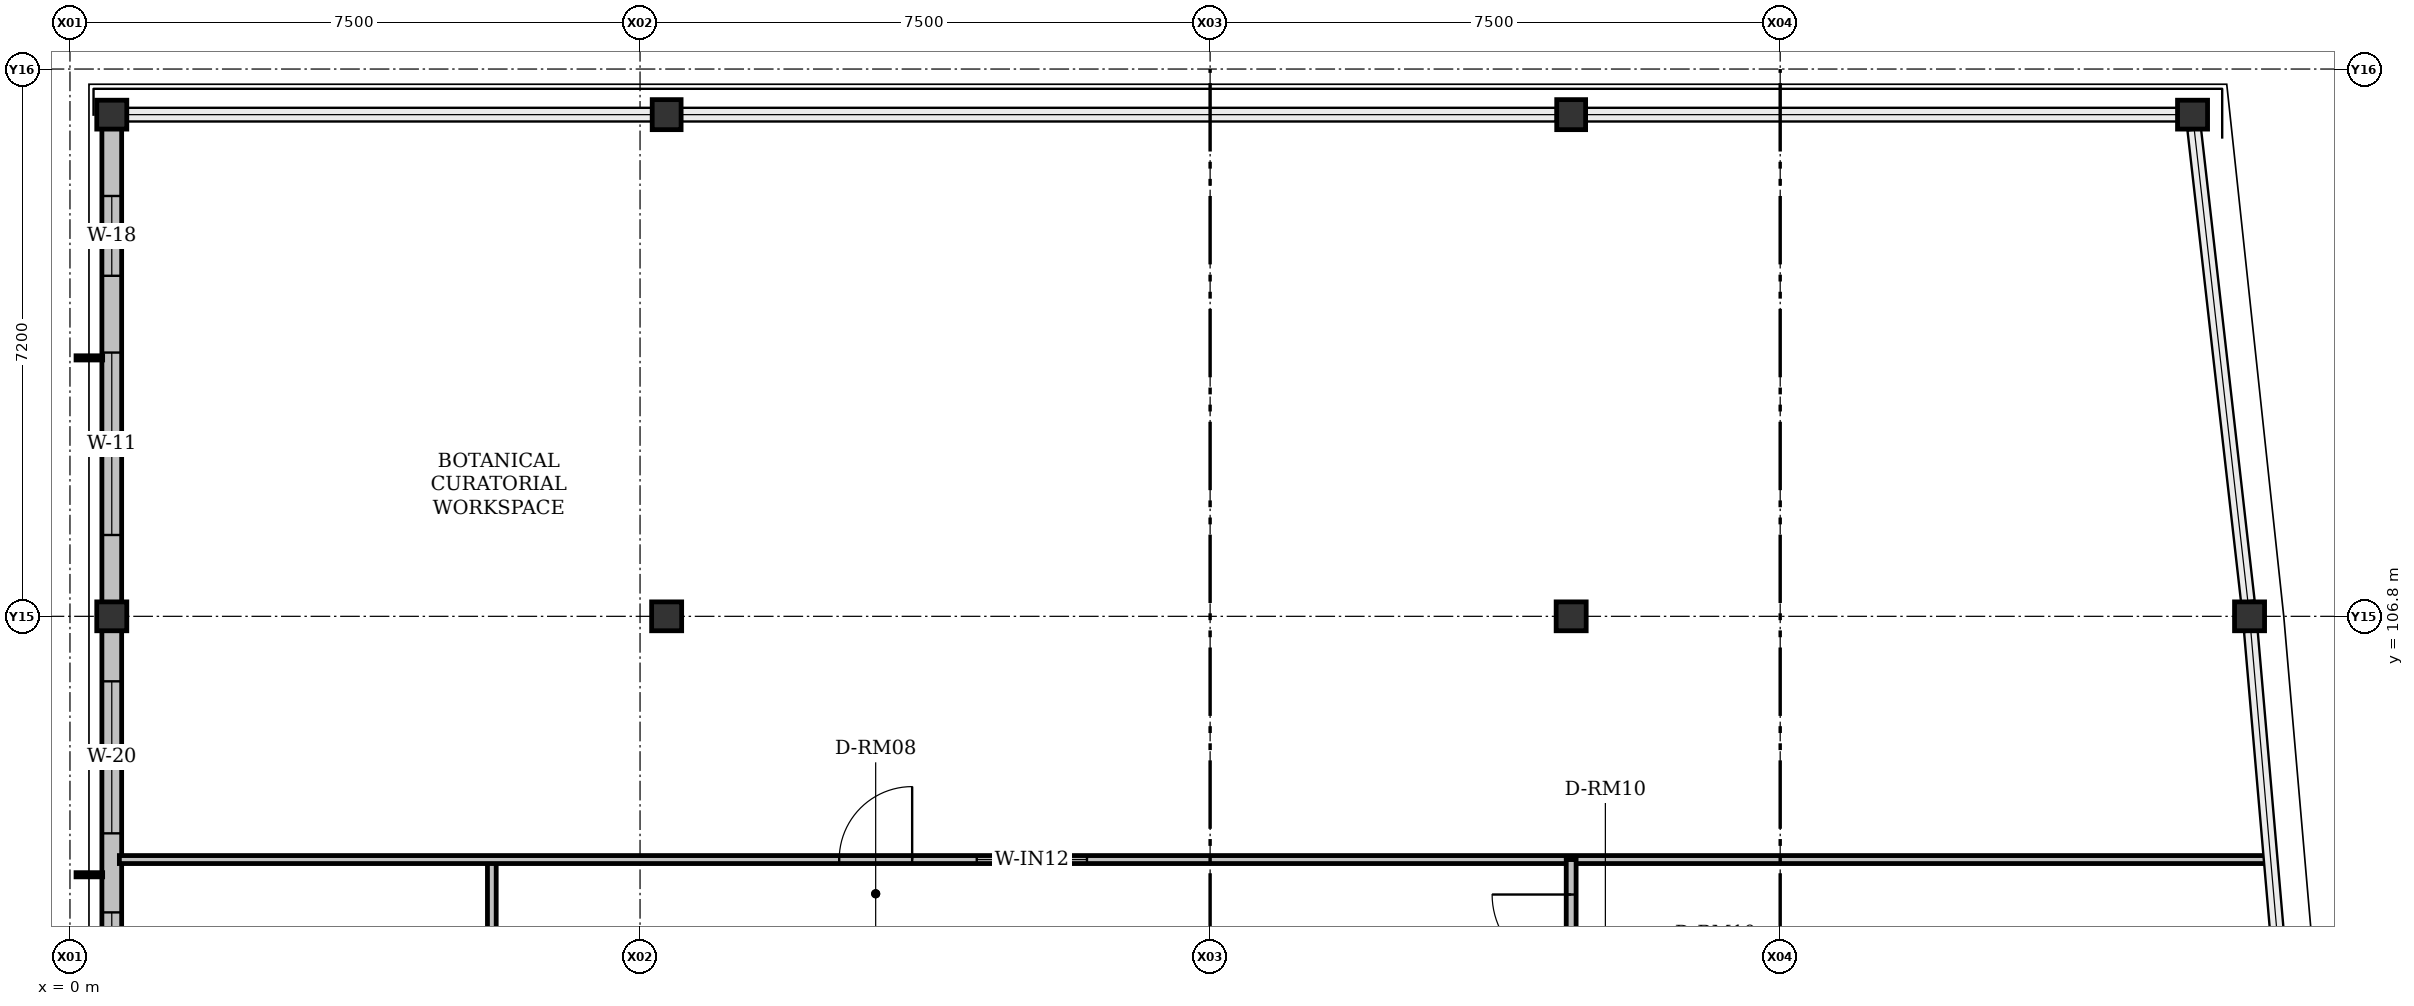
"""IFC4 building model, lengths in metres.
Left out: names, types, materials, properties, quantities, classifications, styles, units other than length and angle.
Written with IfcOpenShell. Run it as: python <this file> out.ifc"""

import sys

from ifc_helpers import new_model, si_unit, direction, frame, frame_2d, origin, origin_2d, place, context, subcontext, project, spatial, rectangle, i_section, extrude, element, fill, save


model = new_model("IFC4")
c1 = context("Model", 3, precision=1e-05, world=origin(), true_north=direction((0.0, 1.0)))
c2 = subcontext(c1, "Body", "Model", "MODEL_VIEW")
j1 = project(units=[si_unit("LENGTHUNIT", "METRE"), si_unit("PLANEANGLEUNIT", "RADIAN")], contexts=[c1])
p1 = place(None, origin())
s1 = spatial("IfcSite", under=j1, at=p1, CompositionType="ELEMENT")
p2 = place(p1, origin())
s2 = spatial("IfcBuilding", under=s1, at=p2, CompositionType="ELEMENT")
p3 = place(p2, frame((0.0, 0.0, 18.3)))
s3 = spatial("IfcBuildingStorey", under=s2, at=p3, CompositionType="ELEMENT", Elevation=18.3)
for number, where, z_axis, x_axis in (
    (1, (0.55, 106.8, 0.0), (0.0, 0.0, 1.0), (1.0, 0.0, 0.0)),
    (2, (7.85, 106.8, 0.0), (0.0, 0.0, 1.0), (1.0, 0.0, 0.0)),
    (3, (19.75, 106.8, 0.0), (0.0, 0.0, 1.0), (1.0, 0.0, 0.0)),
    (4, (28.675, 106.8, 0.0), (0.0, 0.0, 1.0), (1.0, 0.0, 0.0)),
    (5, (0.55, 113.4, 0.0), (0.0, 0.0, 1.0), (1.0, 0.0, 0.0)),
    (6, (7.85, 113.4, 0.0), (0.0, 0.0, 1.0), (0.0, 1.0, 0.0)),
    (7, (19.75, 113.4, 0.0), (0.0, 0.0, 1.0), (0.0, 1.0, 0.0)),
    (8, (27.925, 113.4, 0.0), (0.0, 0.0, 1.0), (1.0, 0.0, 0.0)),
):
    element("IfcColumn", number, at=place(p3, frame(where, z_axis=z_axis, x_axis=x_axis)), inside=s3, PredefinedType="COLUMN", context=c2, shape_type="SweptSolid", body=[
        extrude(i_section(OverallWidth=0.395, OverallDepth=0.38, WebThickness=0.019, FlangeThickness=0.03, FilletRadius=0.015, at=origin_2d()), origin(), (0.0, 0.0, 1.0), 4.2),
    ])
p4 = place(p3, frame((0.55, 99.6, 0.0), z_axis=(0.0, 0.0, 1.0), x_axis=(0.0, 1.0, 0.0)))
e9 = element("IfcWall", 9, at=p4, inside=s3, PredefinedType="SOLIDWALL", context=c2, shape_type="SweptSolid", body=[
    extrude(rectangle(XDim=7.2, YDim=0.26, at=frame_2d((3.6, 0.0))), origin(), (0.0, 0.0, 1.0), 3.577),
])
p5 = place(p4, frame((1.205, 0.0, 0.92)))
e10 = element("IfcOpeningElement", 10, at=p5, cuts=e9, PredefinedType="OPENING", context=c2, shape_type="SweptSolid", body=[
    extrude(rectangle(XDim=2.1, YDim=1.55, at=frame_2d((1.05, 0.775))), frame((0.0, 0.13, 0.0), z_axis=(0.0, -1.0, 0.0), x_axis=(1.0, 0.0, 0.0)), (0.0, 0.0, 1.0), 0.26),
])
p6 = place(p4, frame((4.345, 0.0, 0.92)))
e11 = element("IfcOpeningElement", 11, at=p6, cuts=e9, PredefinedType="OPENING", context=c2, shape_type="SweptSolid", body=[
    extrude(rectangle(XDim=2.0, YDim=1.35, at=frame_2d((1.0, 0.675))), frame((0.0, 0.13, 0.0), z_axis=(0.0, -1.0, 0.0), x_axis=(1.0, 0.0, 0.0)), (0.0, 0.0, 1.0), 0.26),
])
p7 = place(p3, frame((0.55, 106.8, 0.0), z_axis=(0.0, 0.0, 1.0), x_axis=(0.0, 1.0, 0.0)))
e12 = element("IfcWall", 12, at=p7, inside=s3, PredefinedType="SOLIDWALL", context=c2, shape_type="SweptSolid", body=[
    extrude(rectangle(XDim=6.6, YDim=0.26, at=frame_2d((3.3, 0.0))), origin(), (0.0, 0.0, 1.0), 3.577),
])
p8 = place(p7, frame((1.07, 0.0, 0.92)))
e13 = element("IfcOpeningElement", 13, at=p8, cuts=e12, PredefinedType="OPENING", context=c2, shape_type="SweptSolid", body=[
    extrude(rectangle(XDim=2.4, YDim=1.55, at=frame_2d((1.2, 0.775))), frame((0.0, 0.13, 0.0), z_axis=(0.0, -1.0, 0.0), x_axis=(1.0, 0.0, 0.0)), (0.0, 0.0, 1.0), 0.26),
])
p9 = place(p7, frame((4.48, 0.0, 0.92)))
e14 = element("IfcOpeningElement", 14, at=p9, cuts=e12, PredefinedType="OPENING", context=c2, shape_type="SweptSolid", body=[
    extrude(rectangle(XDim=1.05, YDim=1.3, at=frame_2d((0.525, 0.65))), frame((0.0, 0.13, 0.0), z_axis=(0.0, -1.0, 0.0), x_axis=(1.0, 0.0, 0.0)), (0.0, 0.0, 1.0), 0.26),
])
p10 = place(p3, frame((5.55, 92.4, 0.0), z_axis=(0.0, 0.0, 1.0), x_axis=(0.0, 1.0, 0.0)))
e15 = element("IfcWall", 15, at=p10, inside=s3, PredefinedType="PARTITIONING", context=c2, shape_type="SweptSolid", body=[
    extrude(rectangle(XDim=11.2, YDim=0.115, at=frame_2d((5.6, 0.0))), origin(), (0.0, 0.0, 1.0), 3.451),
])
p11 = place(p10, frame((5.14, 0.0, 0.0)))
e16 = element("IfcOpeningElement", 16, at=p11, cuts=e15, PredefinedType="OPENING", context=c2, shape_type="SweptSolid", body=[
    extrude(rectangle(XDim=0.92, YDim=2.15, at=frame_2d((0.46, 1.075))), frame((0.0, 0.058, 0.0), z_axis=(0.0, -1.0, 0.0), x_axis=(1.0, 0.0, 0.0)), (0.0, 0.0, 1.0), 0.115),
])
p12 = place(p10, frame((6.91, 0.0, 0.92)))
e17 = element("IfcOpeningElement", 17, at=p12, cuts=e15, PredefinedType="OPENING", context=c2, shape_type="SweptSolid", body=[
    extrude(rectangle(XDim=1.3, YDim=1.3, at=frame_2d((0.65, 0.65))), frame((0.0, 0.058, 0.0), z_axis=(0.0, -1.0, 0.0), x_axis=(1.0, 0.0, 0.0)), (0.0, 0.0, 1.0), 0.115),
])
p13 = place(p3, frame((0.65, 103.6, 0.0), z_axis=(0.0, 0.0, 1.0), x_axis=(1.0, 0.0, 0.0)))
e18 = element("IfcWall", 18, at=p13, inside=s3, PredefinedType="PARTITIONING", context=c2, shape_type="SweptSolid", body=[
    extrude(rectangle(XDim=28.265, YDim=0.105, at=frame_2d((14.133, 0.0))), origin(), (0.0, 0.0, 1.0), 3.527),
])
p14 = place(p13, frame((9.47, 0.0, 0.0)))
e19 = element("IfcOpeningElement", 19, at=p14, cuts=e18, PredefinedType="OPENING", context=c2, shape_type="SweptSolid", body=[
    extrude(rectangle(XDim=0.96, YDim=2.15, at=frame_2d((0.48, 1.075))), frame((0.0, 0.052, 0.0), z_axis=(0.0, -1.0, 0.0), x_axis=(1.0, 0.0, 0.0)), (0.0, 0.0, 1.0), 0.105),
])
p15 = place(p13, frame((11.28, 0.0, 0.92)))
e20 = element("IfcOpeningElement", 20, at=p15, cuts=e18, PredefinedType="OPENING", context=c2, shape_type="SweptSolid", body=[
    extrude(rectangle(XDim=1.45, YDim=1.3, at=frame_2d((0.725, 0.65))), frame((0.0, 0.052, 0.0), z_axis=(0.0, -1.0, 0.0), x_axis=(1.0, 0.0, 0.0)), (0.0, 0.0, 1.0), 0.105),
])
p16 = place(p3, frame((19.75, 99.792, 0.0), z_axis=(0.0, 0.0, 1.0), x_axis=(0.0, 1.0, 0.0)))
e21 = element("IfcWall", 21, at=p16, inside=s3, PredefinedType="PARTITIONING", context=c2, shape_type="SweptSolid", body=[
    extrude(rectangle(XDim=3.808, YDim=0.13, at=frame_2d((1.904, 0.0))), origin(), (0.0, 0.0, 1.0), 3.527),
])
p17 = place(p16, frame((2.308, 0.0, 0.0)))
e22 = element("IfcOpeningElement", 22, at=p17, cuts=e21, PredefinedType="OPENING", context=c2, shape_type="SweptSolid", body=[
    extrude(rectangle(XDim=1.04, YDim=2.15, at=frame_2d((0.52, 1.075))), frame((0.0, 0.065, 0.0), z_axis=(0.0, -1.0, 0.0), x_axis=(1.0, 0.0, 0.0)), (0.0, 0.0, 1.0), 0.13),
])
p18 = place(p5, origin())
e23 = element("IfcWindow", 23, at=p18, inside=s3, PartitioningType="DOUBLE_PANEL_VERTICAL", PredefinedType="WINDOW", context=c2, shape_type="SweptSolid", body=[
    extrude(rectangle(XDim=2.1, YDim=1.55, at=frame_2d((1.05, 0.775))), frame((0.0, 0.03, 0.0), z_axis=(0.0, -1.0, 0.0), x_axis=(1.0, 0.0, 0.0)), (0.0, 0.0, 1.0), 0.06),
])
fill(e10, e23)
p19 = place(p6, origin())
e24 = element("IfcWindow", 24, at=p19, inside=s3, PartitioningType="DOUBLE_PANEL_VERTICAL", PredefinedType="WINDOW", context=c2, shape_type="SweptSolid", body=[
    extrude(rectangle(XDim=2.0, YDim=1.35, at=frame_2d((1.0, 0.675))), frame((0.0, 0.03, 0.0), z_axis=(0.0, -1.0, 0.0), x_axis=(1.0, 0.0, 0.0)), (0.0, 0.0, 1.0), 0.06),
])
fill(e11, e24)
p20 = place(p8, origin())
e25 = element("IfcWindow", 25, at=p20, inside=s3, PartitioningType="DOUBLE_PANEL_VERTICAL", PredefinedType="WINDOW", context=c2, shape_type="SweptSolid", body=[
    extrude(rectangle(XDim=2.4, YDim=1.55, at=frame_2d((1.2, 0.775))), frame((0.0, 0.03, 0.0), z_axis=(0.0, -1.0, 0.0), x_axis=(1.0, 0.0, 0.0)), (0.0, 0.0, 1.0), 0.06),
])
fill(e13, e25)
p21 = place(p9, origin())
e26 = element("IfcWindow", 26, at=p21, inside=s3, PartitioningType="SINGLE_PANEL", PredefinedType="WINDOW", context=c2, shape_type="SweptSolid", body=[
    extrude(rectangle(XDim=1.05, YDim=1.3, at=frame_2d((0.525, 0.65))), frame((0.0, 0.03, 0.0), z_axis=(0.0, -1.0, 0.0), x_axis=(1.0, 0.0, 0.0)), (0.0, 0.0, 1.0), 0.06),
])
fill(e14, e26)
p22 = place(p14, origin())
e27 = element("IfcDoor", 27, at=p22, inside=s3, OperationType="SINGLE_SWING_RIGHT", PredefinedType="DOOR", context=c2, shape_type="SweptSolid", body=[
    extrude(rectangle(XDim=0.96, YDim=2.15, at=frame_2d((0.48, 1.075))), frame((0.0, 0.025, 0.0), z_axis=(0.0, -1.0, 0.0), x_axis=(1.0, 0.0, 0.0)), (0.0, 0.0, 1.0), 0.05),
])
fill(e19, e27)
p23 = place(p15, origin())
e28 = element("IfcWindow", 28, at=p23, inside=s3, PartitioningType="SINGLE_PANEL", PredefinedType="WINDOW", context=c2, shape_type="SweptSolid", body=[
    extrude(rectangle(XDim=1.45, YDim=1.3, at=frame_2d((0.725, 0.65))), frame((0.0, 0.03, 0.0), z_axis=(0.0, -1.0, 0.0), x_axis=(1.0, 0.0, 0.0)), (0.0, 0.0, 1.0), 0.06),
])
fill(e20, e28)
p24 = place(p17, origin())
e29 = element("IfcDoor", 29, at=p24, inside=s3, OperationType="SINGLE_SWING_RIGHT", PredefinedType="DOOR", context=c2, shape_type="SweptSolid", body=[
    extrude(rectangle(XDim=1.04, YDim=2.15, at=frame_2d((0.52, 1.075))), frame((0.0, 0.025, 0.0), z_axis=(0.0, -1.0, 0.0), x_axis=(1.0, 0.0, 0.0)), (0.0, 0.0, 1.0), 0.05),
])
fill(e22, e29)
save(model, sys.argv[1])
